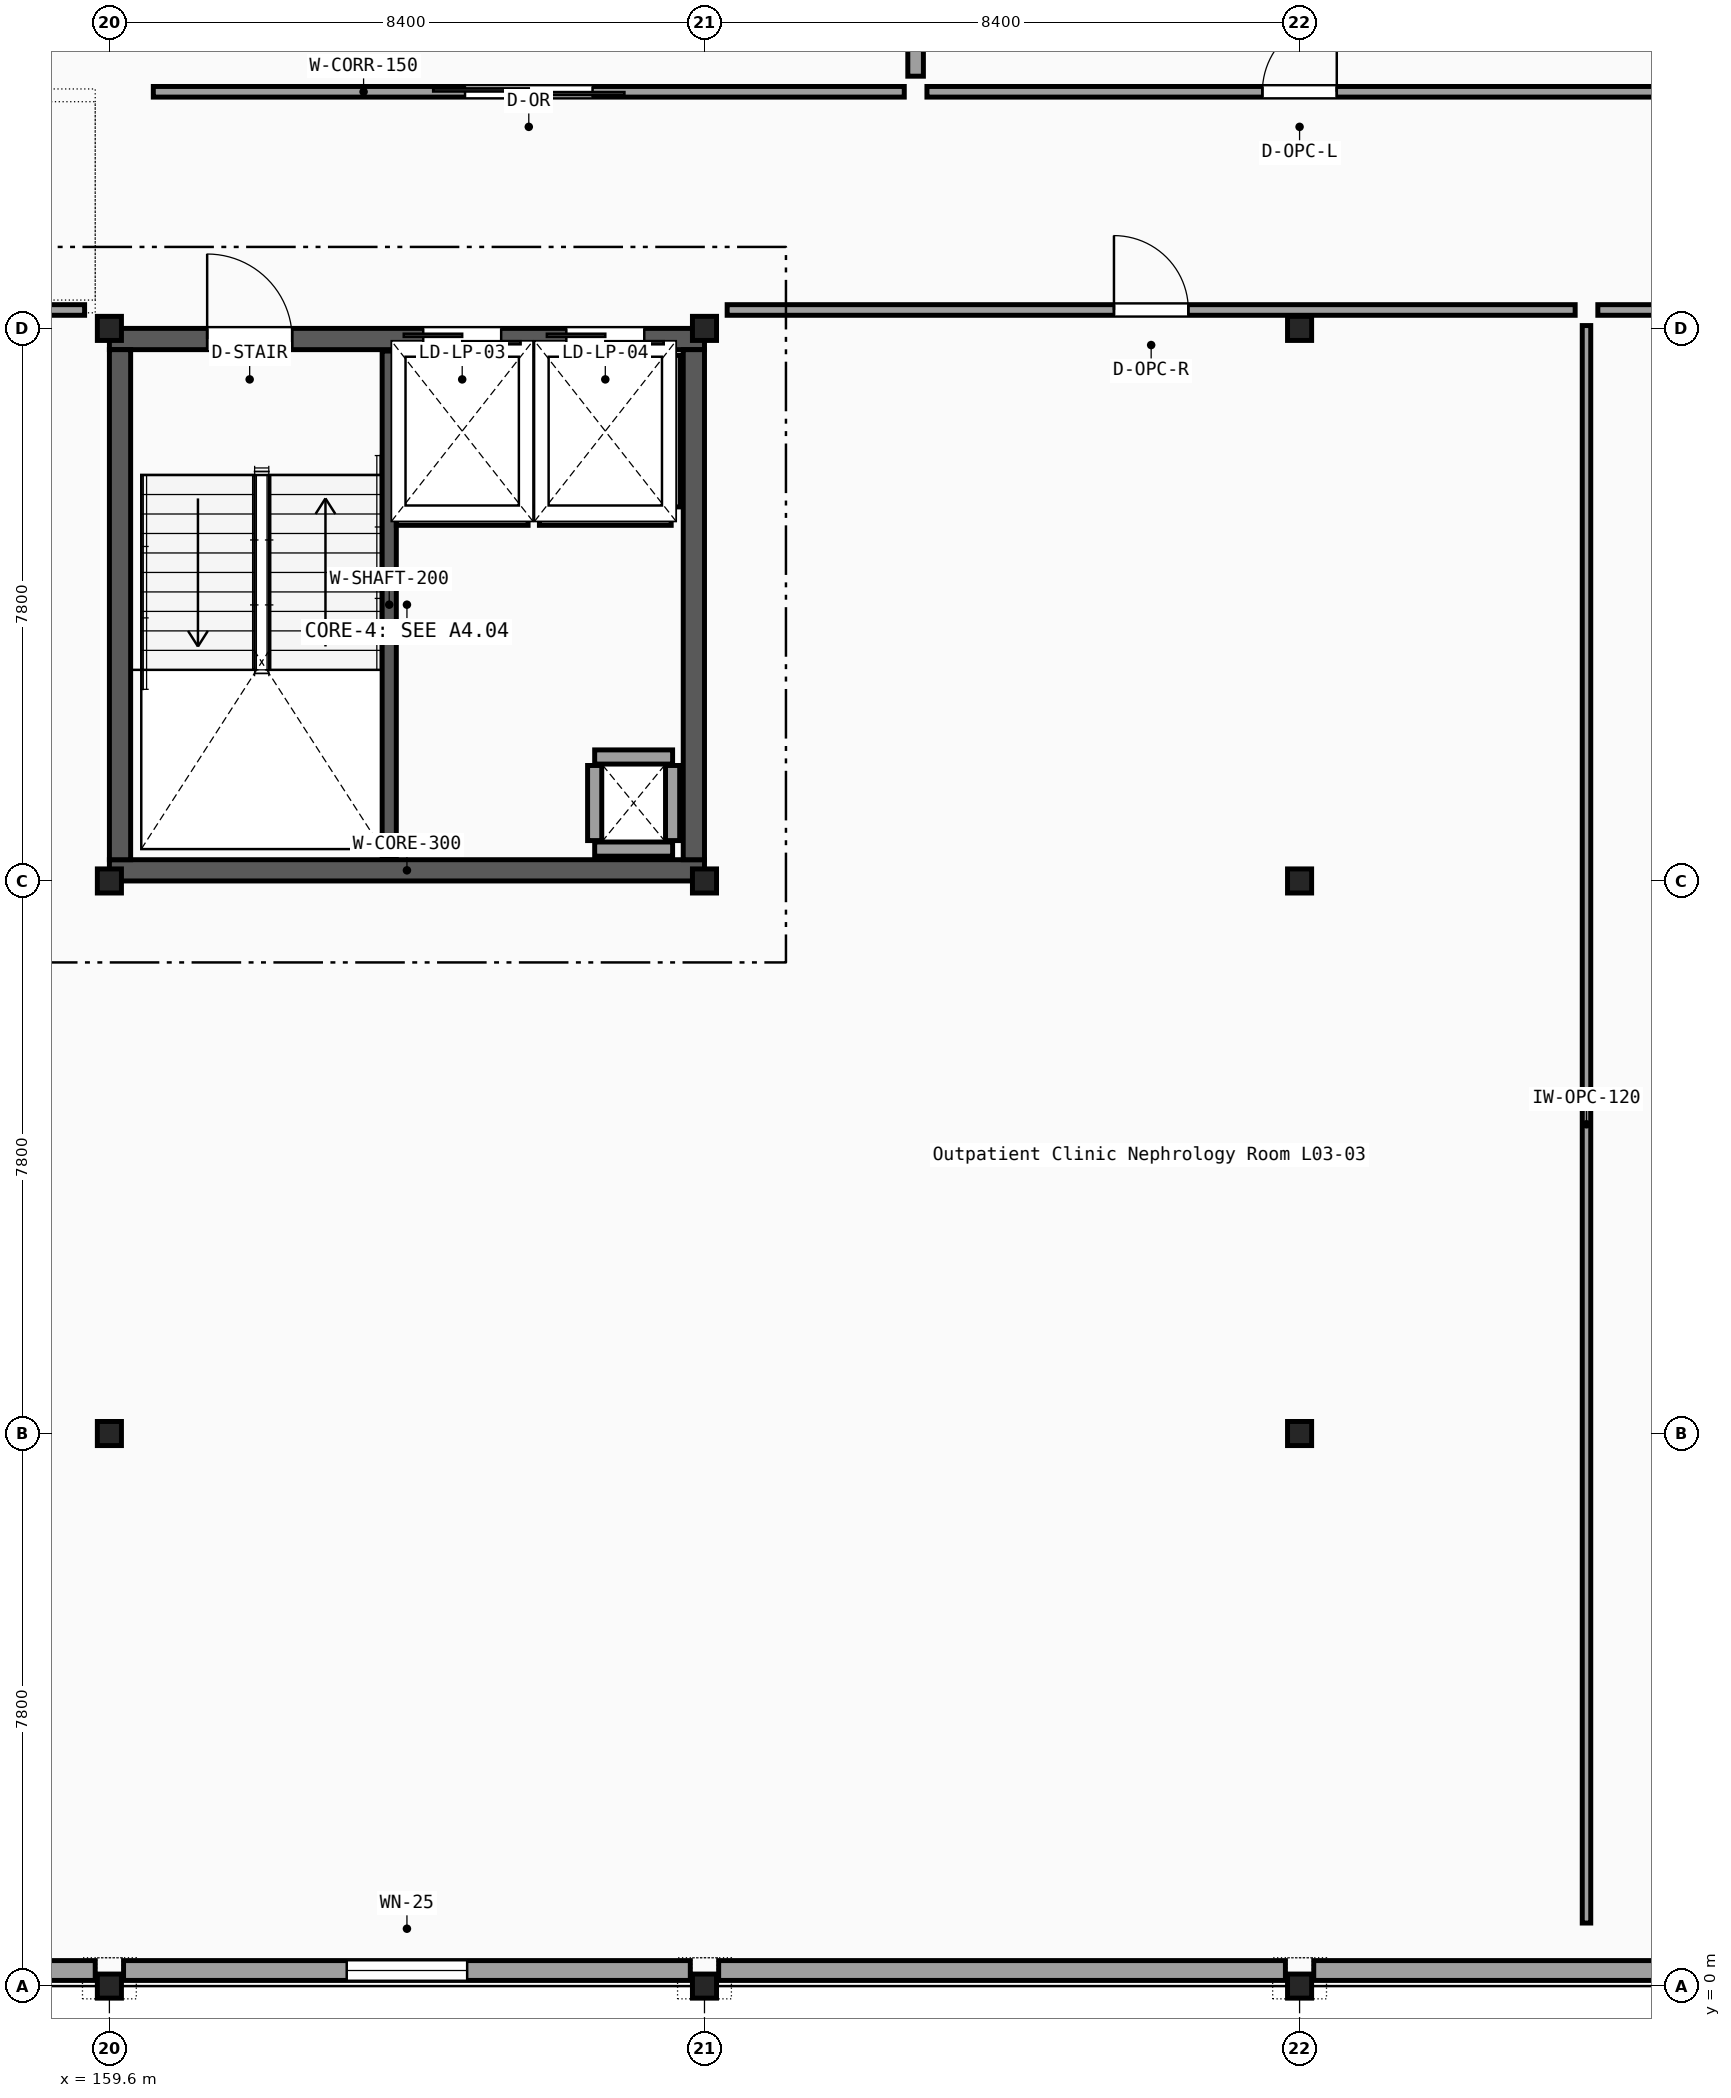
"""IFC4 building model, lengths in metres.
Left out: names, types, materials, properties, quantities, classifications, styles, units other than length and angle.
Written with IfcOpenShell. Run it as: python <this file> out.ifc"""

import sys

from ifc_helpers import new_model, si_unit, direction, frame, frame_2d, origin, origin_2d, place, context, subcontext, project, spatial, rectangle, i_section, extrude, element, fill, save


model = new_model("IFC4")
c1 = context("Model", 3, precision=1e-05, world=origin(), true_north=direction((0.0, 1.0)))
c2 = subcontext(c1, "Body", "Model", "MODEL_VIEW")
j1 = project(units=[si_unit("LENGTHUNIT", "METRE"), si_unit("PLANEANGLEUNIT", "RADIAN")], contexts=[c1])
p1 = place(None, origin())
s1 = spatial("IfcSite", under=j1, at=p1, CompositionType="ELEMENT")
p2 = place(p1, origin())
s2 = spatial("IfcBuilding", under=s1, at=p2, CompositionType="ELEMENT")
p3 = place(p2, frame((0.0, 0.0, 14.85)))
s3 = spatial("IfcBuildingStorey", under=s2, at=p3, CompositionType="ELEMENT", Elevation=14.85)
for number, where, z_axis, x_axis in (
    (1, (159.6, 0.0, 0.0), (0.0, 0.0, 1.0), (1.0, 0.0, 0.0)),
    (2, (159.6, 7.8, 0.0), (0.0, 0.0, 1.0), (1.0, 0.0, 0.0)),
    (3, (159.6, 15.6, 0.0), (0.0, 0.0, 1.0), (1.0, 0.0, 0.0)),
    (4, (159.6, 23.4, 0.0), (0.0, 0.0, 1.0), (1.0, 0.0, 0.0)),
    (5, (168.0, 0.0, 0.0), (0.0, 0.0, 1.0), (1.0, 0.0, 0.0)),
    (6, (168.0, 15.6, 0.0), (0.0, 0.0, 1.0), (1.0, 0.0, 0.0)),
    (7, (168.0, 23.4, 0.0), (0.0, 0.0, 1.0), (1.0, 0.0, 0.0)),
    (8, (176.4, 0.0, 0.0), (0.0, 0.0, 1.0), (1.0, 0.0, 0.0)),
    (9, (176.4, 7.8, 0.0), (0.0, 0.0, 1.0), (1.0, 0.0, 0.0)),
    (10, (176.4, 15.6, 0.0), (0.0, 0.0, 1.0), (1.0, 0.0, 0.0)),
    (11, (176.4, 23.4, 0.0), (0.0, 0.0, 1.0), (1.0, 0.0, 0.0)),
):
    element("IfcColumn", number, at=place(p3, frame(where, z_axis=z_axis, x_axis=x_axis)), inside=s3, PredefinedType="COLUMN", context=c2, shape_type="SweptSolid", body=[
        extrude(i_section(OverallWidth=0.3, OverallDepth=0.34, WebThickness=0.012, FlangeThickness=0.021, FilletRadius=0.027, at=origin_2d()), origin(), (0.0, 0.0, 1.0), 4.05),
    ])
p4 = place(p3, frame((151.4, 0.22, 0.0), z_axis=(0.0, 0.0, 1.0), x_axis=(1.0, 0.0, 0.0)))
e12 = element("IfcWall", 12, at=p4, inside=s3, PredefinedType="SOLIDWALL", context=c2, shape_type="SweptSolid", body=[
    extrude(rectangle(XDim=8.0, YDim=0.28, at=frame_2d((4.0, 0.0))), origin(), (0.0, 0.0, 1.0), 3.4),
])
p5 = place(p3, frame((159.8, 0.22, 0.0), z_axis=(0.0, 0.0, 1.0), x_axis=(1.0, 0.0, 0.0)))
e13 = element("IfcWall", 13, at=p5, inside=s3, PredefinedType="SOLIDWALL", context=c2, shape_type="SweptSolid", body=[
    extrude(rectangle(XDim=8.0, YDim=0.28, at=frame_2d((4.0, 0.0))), origin(), (0.0, 0.0, 1.0), 3.4),
])
p6 = place(p5, frame((3.15, 0.0, 0.95)))
e14 = element("IfcOpeningElement", 14, at=p6, cuts=e13, PredefinedType="OPENING", context=c2, shape_type="SweptSolid", body=[
    extrude(rectangle(XDim=1.7, YDim=1.55, at=frame_2d((0.85, 0.775))), frame((0.0, 0.15, 0.0), z_axis=(0.0, -1.0, 0.0), x_axis=(1.0, 0.0, 0.0)), (0.0, 0.0, 1.0), 0.3),
])
for number, where, z_axis, x_axis in (
    (15, (168.2, 0.22, 0.0), (0.0, 0.0, 1.0), (1.0, 0.0, 0.0)),
    (16, (176.6, 0.22, 0.0), (0.0, 0.0, 1.0), (1.0, 0.0, 0.0)),
):
    element("IfcWall", number, at=place(p3, frame(where, z_axis=z_axis, x_axis=x_axis)), inside=s3, PredefinedType="SOLIDWALL", context=c2, shape_type="SweptSolid", body=[
        extrude(rectangle(XDim=8.0, YDim=0.28, at=frame_2d((4.0, 0.0))), origin(), (0.0, 0.0, 1.0), 3.4),
    ])
p7 = place(p3, frame((159.6, 15.75, 0.0), z_axis=(0.0, 0.0, 1.0), x_axis=(1.0, 0.0, 0.0)))
e17 = element("IfcWall", 17, at=p7, inside=s3, PredefinedType="SHEAR", context=c2, shape_type="SweptSolid", body=[
    extrude(rectangle(XDim=8.4, YDim=0.3, at=frame_2d((4.2, 0.0))), origin(), (0.0, 0.0, 1.0), 3.82),
])
p8 = place(p3, frame((159.6, 23.25, 0.0), z_axis=(0.0, 0.0, 1.0), x_axis=(1.0, 0.0, 0.0)))
e18 = element("IfcWall", 18, at=p8, inside=s3, PredefinedType="SHEAR", context=c2, shape_type="SweptSolid", body=[
    extrude(rectangle(XDim=8.4, YDim=0.3, at=frame_2d((4.2, 0.0))), origin(), (0.0, 0.0, 1.0), 3.82),
])
p9 = place(p8, frame((1.38, 0.0, 0.0)))
e19 = element("IfcOpeningElement", 19, at=p9, cuts=e18, PredefinedType="OPENING", context=c2, shape_type="SweptSolid", body=[
    extrude(rectangle(XDim=1.2, YDim=2.15, at=frame_2d((0.6, 1.075))), frame((0.0, 0.16, 0.0), z_axis=(0.0, -1.0, 0.0), x_axis=(1.0, 0.0, 0.0)), (0.0, 0.0, 1.0), 0.32),
])
p10 = place(p8, frame((4.43, 0.0, 0.0)))
e20 = element("IfcOpeningElement", 20, at=p10, cuts=e18, PredefinedType="OPENING", context=c2, shape_type="SweptSolid", body=[
    extrude(rectangle(XDim=1.1, YDim=2.15, at=frame_2d((0.55, 1.075))), frame((0.0, 0.16, 0.0), z_axis=(0.0, -1.0, 0.0), x_axis=(1.0, 0.0, 0.0)), (0.0, 0.0, 1.0), 0.32),
])
p11 = place(p8, frame((6.45, 0.0, 0.0)))
e21 = element("IfcOpeningElement", 21, at=p11, cuts=e18, PredefinedType="OPENING", context=c2, shape_type="SweptSolid", body=[
    extrude(rectangle(XDim=1.1, YDim=2.15, at=frame_2d((0.55, 1.075))), frame((0.0, 0.16, 0.0), z_axis=(0.0, -1.0, 0.0), x_axis=(1.0, 0.0, 0.0)), (0.0, 0.0, 1.0), 0.32),
])
for number, where, z_axis, x_axis in (
    (22, (159.75, 15.9, 0.0), (0.0, 0.0, 1.0), (0.0, 1.0, 0.0)),
    (23, (167.85, 15.9, 0.0), (0.0, 0.0, 1.0), (0.0, 1.0, 0.0)),
):
    element("IfcWall", number, at=place(p3, frame(where, z_axis=z_axis, x_axis=x_axis)), inside=s3, PredefinedType="SHEAR", context=c2, shape_type="SweptSolid", body=[
        extrude(rectangle(XDim=7.2, YDim=0.3, at=frame_2d((3.6, 0.0))), origin(), (0.0, 0.0, 1.0), 3.82),
    ])
p12 = place(p3, frame((163.55, 15.92, 0.0), z_axis=(0.0, 0.0, 1.0), x_axis=(0.0, 1.0, 0.0)))
e24 = element("IfcWall", 24, at=p12, inside=s3, PredefinedType="SHEAR", context=c2, shape_type="SweptSolid", body=[
    extrude(rectangle(XDim=7.16, YDim=0.2, at=frame_2d((3.58, 0.0))), origin(), (0.0, 0.0, 1.0), 3.82),
])
for number, where, z_axis, x_axis in (
    (25, (166.45, 16.05, 0.0), (0.0, 0.0, 1.0), (1.0, 0.0, 0.0)),
    (26, (166.45, 17.35, 0.0), (0.0, 0.0, 1.0), (1.0, 0.0, 0.0)),
):
    element("IfcWall", number, at=place(p3, frame(where, z_axis=z_axis, x_axis=x_axis)), inside=s3, PredefinedType="PARTITIONING", context=c2, shape_type="SweptSolid", body=[
        extrude(rectangle(XDim=1.1, YDim=0.2, at=frame_2d((0.55, 0.0))), origin(), (0.0, 0.0, 1.0), 3.2),
    ])
for number, where, z_axis, x_axis in (
    (27, (166.45, 16.17, 0.0), (0.0, 0.0, 1.0), (0.0, 1.0, 0.0)),
    (28, (167.55, 16.17, 0.0), (0.0, 0.0, 1.0), (0.0, 1.0, 0.0)),
):
    element("IfcWall", number, at=place(p3, frame(where, z_axis=z_axis, x_axis=x_axis)), inside=s3, PredefinedType="PARTITIONING", context=c2, shape_type="SweptSolid", body=[
        extrude(rectangle(XDim=1.06, YDim=0.2, at=frame_2d((0.53, 0.0))), origin(), (0.0, 0.0, 1.0), 3.2),
    ])
p13 = place(p3, frame((165.54, 20.88, 0.0), z_axis=(0.0, 0.0, 1.0), x_axis=(0.0, 1.0, 0.0)))
e29 = element("IfcWall", 29, at=p13, inside=s3, PredefinedType="PARTITIONING", context=c2, shape_type="SweptSolid", body=[
    extrude(rectangle(XDim=2.14, YDim=0.2, at=frame_2d((1.07, 0.0))), origin(), (0.0, 0.0, 1.0), 3.2),
])
p14 = place(p3, frame((163.65, 20.72, 0.0), z_axis=(0.0, 0.0, 1.0), x_axis=(1.0, 0.0, 0.0)))
e30 = element("IfcWall", 30, at=p14, inside=s3, PredefinedType="PARTITIONING", context=c2, shape_type="SweptSolid", body=[
    extrude(rectangle(XDim=1.86, YDim=0.2, at=frame_2d((0.93, 0.0))), origin(), (0.0, 0.0, 1.0), 3.2),
])
p15 = place(p3, frame((167.56, 20.88, 0.0), z_axis=(0.0, 0.0, 1.0), x_axis=(0.0, 1.0, 0.0)))
e31 = element("IfcWall", 31, at=p15, inside=s3, PredefinedType="PARTITIONING", context=c2, shape_type="SweptSolid", body=[
    extrude(rectangle(XDim=2.14, YDim=0.2, at=frame_2d((1.07, 0.0))), origin(), (0.0, 0.0, 1.0), 3.2),
])
p16 = place(p3, frame((165.67, 20.72, 0.0), z_axis=(0.0, 0.0, 1.0), x_axis=(1.0, 0.0, 0.0)))
e32 = element("IfcWall", 32, at=p16, inside=s3, PredefinedType="PARTITIONING", context=c2, shape_type="SweptSolid", body=[
    extrude(rectangle(XDim=1.86, YDim=0.2, at=frame_2d((0.93, 0.0))), origin(), (0.0, 0.0, 1.0), 3.2),
])
p17 = place(p3, frame((151.52, 23.66, 0.0), z_axis=(0.0, 0.0, 1.0), x_axis=(1.0, 0.0, 0.0)))
e33 = element("IfcWall", 33, at=p17, inside=s3, PredefinedType="PARTITIONING", context=c2, shape_type="SweptSolid", body=[
    extrude(rectangle(XDim=7.73, YDim=0.15, at=frame_2d((3.865, 0.0))), origin(), (0.0, 0.0, 1.0), 3.2),
])
p18 = place(p17, frame((3.34, 0.0, 0.0)))
e34 = element("IfcOpeningElement", 34, at=p18, cuts=e33, PredefinedType="OPENING", context=c2, shape_type="SweptSolid", body=[
    extrude(rectangle(XDim=1.05, YDim=2.15, at=frame_2d((0.525, 1.075))), frame((0.0, 0.085, 0.0), z_axis=(0.0, -1.0, 0.0), x_axis=(1.0, 0.0, 0.0)), (0.0, 0.0, 1.0), 0.17),
])
p19 = place(p3, frame((168.32, 23.66, 0.0), z_axis=(0.0, 0.0, 1.0), x_axis=(1.0, 0.0, 0.0)))
e35 = element("IfcWall", 35, at=p19, inside=s3, PredefinedType="PARTITIONING", context=c2, shape_type="SweptSolid", body=[
    extrude(rectangle(XDim=11.97, YDim=0.15, at=frame_2d((5.985, 0.0))), origin(), (0.0, 0.0, 1.0), 3.3),
])
p20 = place(p19, frame((5.46, 0.0, 0.0)))
e36 = element("IfcOpeningElement", 36, at=p20, cuts=e35, PredefinedType="OPENING", context=c2, shape_type="SweptSolid", body=[
    extrude(rectangle(XDim=1.05, YDim=2.15, at=frame_2d((0.525, 1.075))), frame((0.0, 0.085, 0.0), z_axis=(0.0, -1.0, 0.0), x_axis=(1.0, 0.0, 0.0)), (0.0, 0.0, 1.0), 0.17),
])
p21 = place(p3, frame((180.45, 0.89, 0.0), z_axis=(0.0, 0.0, 1.0), x_axis=(0.0, 1.0, 0.0)))
e37 = element("IfcWall", 37, at=p21, inside=s3, PredefinedType="PARTITIONING", context=c2, shape_type="SweptSolid", body=[
    extrude(rectangle(XDim=22.55, YDim=0.12, at=frame_2d((11.275, 0.0))), origin(), (0.0, 0.0, 1.0), 3.3),
])
p22 = place(p3, frame((180.61, 23.66, 0.0), z_axis=(0.0, 0.0, 1.0), x_axis=(1.0, 0.0, 0.0)))
e38 = element("IfcWall", 38, at=p22, inside=s3, PredefinedType="PARTITIONING", context=c2, shape_type="SweptSolid", body=[
    extrude(rectangle(XDim=11.97, YDim=0.15, at=frame_2d((5.985, 0.0))), origin(), (0.0, 0.0, 1.0), 3.3),
])
p23 = place(p22, frame((5.46, 0.0, 0.0)))
e39 = element("IfcOpeningElement", 39, at=p23, cuts=e38, PredefinedType="OPENING", context=c2, shape_type="SweptSolid", body=[
    extrude(rectangle(XDim=1.05, YDim=2.15, at=frame_2d((0.525, 1.075))), frame((0.0, 0.085, 0.0), z_axis=(0.0, -1.0, 0.0), x_axis=(1.0, 0.0, 0.0)), (0.0, 0.0, 1.0), 0.17),
])
p24 = place(p3, frame((160.22, 26.74, 0.0), z_axis=(0.0, 0.0, 1.0), x_axis=(1.0, 0.0, 0.0)))
e40 = element("IfcWall", 40, at=p24, inside=s3, PredefinedType="PARTITIONING", context=c2, shape_type="SweptSolid", body=[
    extrude(rectangle(XDim=10.6, YDim=0.15, at=frame_2d((5.3, 0.0))), origin(), (0.0, 0.0, 1.0), 3.4),
])
p25 = place(p24, frame((4.4, 0.0, 0.0)))
e41 = element("IfcOpeningElement", 41, at=p25, cuts=e40, PredefinedType="OPENING", context=c2, shape_type="SweptSolid", body=[
    extrude(rectangle(XDim=1.8, YDim=2.4, at=frame_2d((0.9, 1.2))), frame((0.0, 0.085, 0.0), z_axis=(0.0, -1.0, 0.0), x_axis=(1.0, 0.0, 0.0)), (0.0, 0.0, 1.0), 0.17),
])
p26 = place(p3, frame((170.98, 26.96, 0.0), z_axis=(0.0, 0.0, 1.0), x_axis=(0.0, 1.0, 0.0)))
e42 = element("IfcWall", 42, at=p26, inside=s3, PredefinedType="PARTITIONING", context=c2, shape_type="SweptSolid", body=[
    extrude(rectangle(XDim=11.35, YDim=0.22, at=frame_2d((5.675, 0.0))), origin(), (0.0, 0.0, 1.0), 3.3),
])
p27 = place(p3, frame((171.14, 26.74, 0.0), z_axis=(0.0, 0.0, 1.0), x_axis=(1.0, 0.0, 0.0)))
e43 = element("IfcWall", 43, at=p27, inside=s3, PredefinedType="PARTITIONING", context=c2, shape_type="SweptSolid", body=[
    extrude(rectangle(XDim=10.52, YDim=0.15, at=frame_2d((5.26, 0.0))), origin(), (0.0, 0.0, 1.0), 3.4),
])
p28 = place(p27, frame((4.735, 0.0, 0.0)))
e44 = element("IfcOpeningElement", 44, at=p28, cuts=e43, PredefinedType="OPENING", context=c2, shape_type="SweptSolid", body=[
    extrude(rectangle(XDim=1.05, YDim=2.15, at=frame_2d((0.525, 1.075))), frame((0.0, 0.085, 0.0), z_axis=(0.0, -1.0, 0.0), x_axis=(1.0, 0.0, 0.0)), (0.0, 0.0, 1.0), 0.17),
])
p29 = place(p6, origin())
e45 = element("IfcWindow", 45, at=p29, inside=s3, PartitioningType="SINGLE_PANEL", PredefinedType="WINDOW", context=c2, shape_type="SweptSolid", body=[
    extrude(rectangle(XDim=1.7, YDim=1.55, at=frame_2d((0.85, 0.775))), frame((0.0, 0.03, 0.0), z_axis=(0.0, -1.0, 0.0), x_axis=(1.0, 0.0, 0.0)), (0.0, 0.0, 1.0), 0.06),
])
fill(e14, e45)
p30 = place(p9, origin())
e46 = element("IfcDoor", 46, at=p30, inside=s3, OperationType="SINGLE_SWING_LEFT", PredefinedType="DOOR", context=c2, shape_type="SweptSolid", body=[
    extrude(rectangle(XDim=1.2, YDim=2.15, at=frame_2d((0.6, 1.075))), frame((0.0, 0.025, 0.0), z_axis=(0.0, -1.0, 0.0), x_axis=(1.0, 0.0, 0.0)), (0.0, 0.0, 1.0), 0.05),
])
fill(e19, e46)
p31 = place(p10, origin())
e47 = element("IfcDoor", 47, at=p31, inside=s3, OperationType="DOUBLE_DOOR_SLIDING", PredefinedType="DOOR", context=c2, shape_type="SweptSolid", body=[
    extrude(rectangle(XDim=1.1, YDim=2.15, at=frame_2d((0.55, 1.075))), frame((0.0, 0.025, 0.0), z_axis=(0.0, -1.0, 0.0), x_axis=(1.0, 0.0, 0.0)), (0.0, 0.0, 1.0), 0.05),
])
fill(e20, e47)
p32 = place(p11, origin())
e48 = element("IfcDoor", 48, at=p32, inside=s3, OperationType="DOUBLE_DOOR_SLIDING", PredefinedType="DOOR", context=c2, shape_type="SweptSolid", body=[
    extrude(rectangle(XDim=1.1, YDim=2.15, at=frame_2d((0.55, 1.075))), frame((0.0, 0.025, 0.0), z_axis=(0.0, -1.0, 0.0), x_axis=(1.0, 0.0, 0.0)), (0.0, 0.0, 1.0), 0.05),
])
fill(e21, e48)
p33 = place(p20, origin())
e49 = element("IfcDoor", 49, at=p33, inside=s3, OperationType="SINGLE_SWING_LEFT", PredefinedType="DOOR", context=c2, shape_type="SweptSolid", body=[
    extrude(rectangle(XDim=1.05, YDim=2.15, at=frame_2d((0.525, 1.075))), frame((0.0, 0.025, 0.0), z_axis=(0.0, -1.0, 0.0), x_axis=(1.0, 0.0, 0.0)), (0.0, 0.0, 1.0), 0.05),
])
fill(e36, e49)
p34 = place(p25, origin())
e50 = element("IfcDoor", 50, at=p34, inside=s3, OperationType="DOUBLE_DOOR_SLIDING", PredefinedType="DOOR", context=c2, shape_type="SweptSolid", body=[
    extrude(rectangle(XDim=1.8, YDim=2.4, at=frame_2d((0.9, 1.2))), frame((0.0, 0.025, 0.0), z_axis=(0.0, -1.0, 0.0), x_axis=(1.0, 0.0, 0.0)), (0.0, 0.0, 1.0), 0.05),
])
fill(e41, e50)
p35 = place(p28, origin())
e51 = element("IfcDoor", 51, at=p35, inside=s3, OperationType="SINGLE_SWING_RIGHT", PredefinedType="DOOR", context=c2, shape_type="SweptSolid", body=[
    extrude(rectangle(XDim=1.05, YDim=2.15, at=frame_2d((0.525, 1.075))), frame((0.0, 0.025, 0.0), z_axis=(0.0, -1.0, 0.0), x_axis=(1.0, 0.0, 0.0)), (0.0, 0.0, 1.0), 0.05),
])
fill(e44, e51)
save(model, sys.argv[1])
